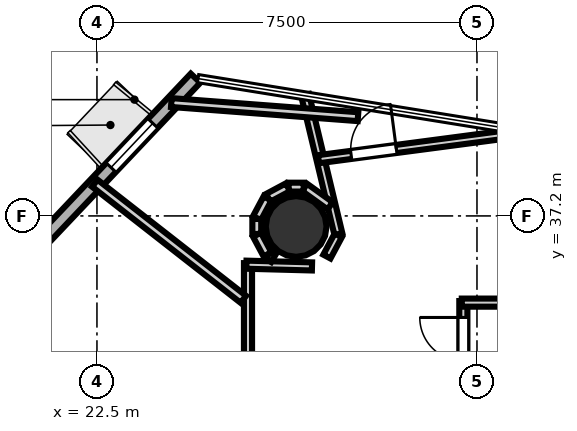
"""IFC4 building model, lengths in metres.
Left out: names, types, materials, properties, quantities, classifications, styles, units other than length and angle.
Written with IfcOpenShell. Run it as: python <this file> out.ifc"""

import sys

from ifc_helpers import new_model, si_unit, direction, frame, frame_2d, origin, origin_2d, place, context, subcontext, project, spatial, rectangle, hollow_circle, extrude, element, fill, save


model = new_model("IFC4")
c1 = context("Model", 3, precision=1e-05, world=origin(), true_north=direction((0.0, 1.0)))
c2 = subcontext(c1, "Body", "Model", "MODEL_VIEW")
j1 = project(units=[si_unit("LENGTHUNIT", "METRE"), si_unit("PLANEANGLEUNIT", "RADIAN")], contexts=[c1])
p1 = place(None, origin())
s1 = spatial("IfcSite", under=j1, at=p1, CompositionType="ELEMENT")
p2 = place(p1, origin())
s2 = spatial("IfcBuilding", under=s1, at=p2, CompositionType="ELEMENT")
p3 = place(p2, frame((0.0, 0.0, 211.4)))
s3 = spatial("IfcBuildingStorey", under=s2, at=p3, CompositionType="ELEMENT", Elevation=211.4)
p4 = place(p3, frame((26.431, 36.992, 0.0), z_axis=(0.0, 0.0, 1.0), x_axis=(1.0, 0.0, 0.0)))
e1 = element("IfcColumn", 1, at=p4, inside=s3, PredefinedType="COLUMN", context=c2, shape_type="SweptSolid", body=[
    extrude(hollow_circle(Radius=0.6, WallThickness=0.03, at=origin_2d()), origin(), (0.0, 0.0, 1.0), 3.7),
])
p5 = place(p3, frame((24.446, 39.918, 0.0), z_axis=(0.0, 0.0, 1.0), x_axis=(-0.687265560939, -0.726406255994, 0.0)))
e2 = element("IfcWall", 2, at=p5, inside=s3, PredefinedType="SOLIDWALL", context=c2, shape_type="SweptSolid", body=[
    extrude(rectangle(XDim=7.155, YDim=0.26, at=frame_2d((3.577, 0.0))), origin(), (0.0, 0.0, 1.0), 3.52),
])
p6 = place(p5, frame((1.226, 0.0, 0.9)))
e3 = element("IfcOpeningElement", 3, at=p6, cuts=e2, PredefinedType="OPENING", context=c2, shape_type="SweptSolid", body=[
    extrude(rectangle(XDim=1.2, YDim=2.0, at=frame_2d((0.6, 1.0))), frame((0.0, 0.14, 0.0), z_axis=(0.0, -1.0, 0.0), x_axis=(1.0, 0.0, 0.0)), (0.0, 0.0, 1.0), 0.28),
])
p7 = place(p5, frame((4.408, 0.0, 0.9)))
e4 = element("IfcOpeningElement", 4, at=p7, cuts=e2, PredefinedType="OPENING", context=c2, shape_type="SweptSolid", body=[
    extrude(rectangle(XDim=1.2, YDim=2.0, at=frame_2d((0.6, 1.0))), frame((0.0, 0.14, 0.0), z_axis=(0.0, -1.0, 0.0), x_axis=(1.0, 0.0, 0.0)), (0.0, 0.0, 1.0), 0.28),
])
p8 = place(p3, frame((29.731, 32.858, 0.0), z_axis=(0.0, 0.0, 1.0), x_axis=(0.0, 1.0, 0.0)))
e5 = element("IfcWall", 5, at=p8, inside=s3, PredefinedType="PARTITIONING", context=c2, shape_type="SweptSolid", body=[
    extrude(rectangle(XDim=2.662, YDim=0.16, at=frame_2d((1.331, 0.0))), origin(), (0.0, 0.0, 1.0), 2.84),
])
p9 = place(p8, frame((1.478, 0.0, 0.0)))
e6 = element("IfcOpeningElement", 6, at=p9, cuts=e5, PredefinedType="OPENING", context=c2, shape_type="SweptSolid", body=[
    extrude(rectangle(XDim=0.86, YDim=2.05, at=frame_2d((0.43, 1.025))), frame((0.0, 0.09, 0.0), z_axis=(0.0, -1.0, 0.0), x_axis=(1.0, 0.0, 0.0)), (0.0, 0.0, 1.0), 0.18),
])
p10 = place(p3, frame((29.7, 35.489, 0.0), z_axis=(0.0, 0.0, 1.0), x_axis=(1.0, 0.0, 0.0)))
e7 = element("IfcWall", 7, at=p10, inside=s3, PredefinedType="PARTITIONING", context=c2, shape_type="SweptSolid", body=[
    extrude(rectangle(XDim=2.72, YDim=0.16, at=frame_2d((1.36, 0.0))), origin(), (0.0, 0.0, 1.0), 2.84),
])
p11 = place(p10, frame((0.76, 0.0, 0.0)))
e8 = element("IfcOpeningElement", 8, at=p11, cuts=e7, PredefinedType="OPENING", context=c2, shape_type="SweptSolid", body=[
    extrude(rectangle(XDim=1.2, YDim=2.15, at=frame_2d((0.6, 1.075))), frame((0.0, 0.09, 0.0), z_axis=(0.0, -1.0, 0.0), x_axis=(1.0, 0.0, 0.0)), (0.0, 0.0, 1.0), 0.18),
])
p12 = place(p3, frame((27.265, 36.839, 0.0), z_axis=(0.0, 0.0, 1.0), x_axis=(-0.23283070684, 0.972517281056, 0.0)))
e9 = element("IfcWall", 9, at=p12, inside=s3, PredefinedType="PARTITIONING", context=c2, shape_type="SweptSolid", body=[
    extrude(rectangle(XDim=2.827, YDim=0.16, at=frame_2d((1.414, 0.0))), origin(), (0.0, 0.0, 1.0), 2.84),
])
p13 = place(p3, frame((26.872, 38.319, 0.0), z_axis=(0.0, 0.0, 1.0), x_axis=(0.99143171072, 0.130626042501, 0.0)))
e10 = element("IfcWall", 10, at=p13, inside=s3, PredefinedType="PARTITIONING", context=c2, shape_type="SweptSolid", body=[
    extrude(rectangle(XDim=4.16, YDim=0.16, at=frame_2d((2.08, 0.0))), origin(), (0.0, 0.0, 1.0), 2.84),
])
p14 = place(p13, frame((0.65, 0.0, 0.0)))
e11 = element("IfcOpeningElement", 11, at=p14, cuts=e10, PredefinedType="OPENING", context=c2, shape_type="SweptSolid", body=[
    extrude(rectangle(XDim=0.9, YDim=2.1, at=frame_2d((0.45, 1.05))), frame((0.0, 0.09, 0.0), z_axis=(0.0, -1.0, 0.0), x_axis=(1.0, 0.0, 0.0)), (0.0, 0.0, 1.0), 0.18),
])
p15 = place(p3, frame((25.481, 18.05, 0.0), z_axis=(0.0, 0.0, 1.0), x_axis=(0.0, 1.0, 0.0)))
e12 = element("IfcWall", 12, at=p15, inside=s3, PredefinedType="PARTITIONING", context=c2, shape_type="SweptSolid", body=[
    extrude(rectangle(XDim=18.219, YDim=0.16, at=frame_2d((9.109, 0.0))), origin(), (0.0, 0.0, 1.0), 2.84),
])
p16 = place(p15, frame((8.659, 0.0, 0.0)))
e13 = element("IfcOpeningElement", 13, at=p16, cuts=e12, PredefinedType="OPENING", context=c2, shape_type="SweptSolid", body=[
    extrude(rectangle(XDim=0.9, YDim=2.1, at=frame_2d((0.45, 1.05))), frame((0.0, 0.09, 0.0), z_axis=(0.0, -1.0, 0.0), x_axis=(1.0, 0.0, 0.0)), (0.0, 0.0, 1.0), 0.18),
])
p17 = place(p3, frame((25.449, 36.238, 0.0), z_axis=(0.0, 0.0, 1.0), x_axis=(0.999651698073, -0.026390955635, 0.0)))
e14 = element("IfcWall", 14, at=p17, inside=s3, PredefinedType="PARTITIONING", context=c2, shape_type="SweptSolid", body=[
    extrude(rectangle(XDim=1.295, YDim=0.16, at=frame_2d((0.647, 0.0))), origin(), (0.0, 0.0, 1.0), 2.84),
])
p18 = place(p3, frame((27.038, 36.398, 0.0), z_axis=(0.0, 0.0, 1.0), x_axis=(0.471865548338, 0.881670519123, 0.0)))
e15 = element("IfcWall", 15, at=p18, inside=s3, PredefinedType="PARTITIONING", context=c2, shape_type="SweptSolid", body=[
    extrude(rectangle(XDim=0.476, YDim=0.16, at=frame_2d((0.238, 0.0))), origin(), (0.0, 0.0, 1.0), 2.84),
])
p19 = place(p3, frame((27.102, 37.4, 0.0), z_axis=(0.0, 0.0, 1.0), x_axis=(-0.811899066426, 0.583797829678, 0.0)))
e16 = element("IfcWall", 16, at=p19, inside=s3, PredefinedType="PLUMBINGWALL", context=c2, shape_type="SweptSolid", body=[
    extrude(rectangle(XDim=0.622, YDim=0.175, at=frame_2d((0.311, 0.0))), origin(), (0.0, 0.0, 1.0), 2.84),
])
p20 = place(p3, frame((26.579, 37.768, 0.0), z_axis=(0.0, 0.0, 1.0), x_axis=(-1.0, 0.0, 0.0)))
e17 = element("IfcWall", 17, at=p20, inside=s3, PredefinedType="PLUMBINGWALL", context=c2, shape_type="SweptSolid", body=[
    extrude(rectangle(XDim=0.297, YDim=0.175, at=frame_2d((0.148, 0.0))), origin(), (0.0, 0.0, 1.0), 2.84),
])
for number, where, z_axis, x_axis in (
    (18, (26.268, 37.765, 0.0), (0.0, 0.0, 1.0), (-0.882, -0.471, 0.0)),
    (19, (25.866, 37.544, 0.0), (0.0, 0.0, 1.0), (-0.471, -0.882, 0.0)),
):
    element("IfcWall", number, at=place(p3, frame(where, z_axis=z_axis, x_axis=x_axis)), inside=s3, PredefinedType="PLUMBINGWALL", context=c2, shape_type="SweptSolid", body=[
        extrude(rectangle(XDim=0.441, YDim=0.175, at=frame_2d((0.221, 0.0))), origin(), (0.0, 0.0, 1.0), 2.84),
    ])
p21 = place(p3, frame((25.655, 37.14, 0.0), z_axis=(0.0, 0.0, 1.0), x_axis=(0.0, -1.0, 0.0)))
e20 = element("IfcWall", 20, at=p21, inside=s3, PredefinedType="PLUMBINGWALL", context=c2, shape_type="SweptSolid", body=[
    extrude(rectangle(XDim=0.297, YDim=0.175, at=frame_2d((0.148, 0.0))), origin(), (0.0, 0.0, 1.0), 2.84),
])
p22 = place(p3, frame((25.658, 36.829, 0.0), z_axis=(0.0, 0.0, 1.0), x_axis=(0.471392110461, -0.881923737177, 0.0)))
e21 = element("IfcWall", 21, at=p22, inside=s3, PredefinedType="PLUMBINGWALL", context=c2, shape_type="SweptSolid", body=[
    extrude(rectangle(XDim=0.441, YDim=0.175, at=frame_2d((0.221, 0.0))), origin(), (0.0, 0.0, 1.0), 2.84),
])
p23 = place(p3, frame((25.878, 36.428, 0.0), z_axis=(0.0, 0.0, 1.0), x_axis=(0.860098766691, -0.510127544382, 0.0)))
e22 = element("IfcWall", 22, at=p23, inside=s3, PredefinedType="PLUMBINGWALL", context=c2, shape_type="SweptSolid", body=[
    extrude(rectangle(XDim=0.124, YDim=0.175, at=frame_2d((0.062, 0.0))), origin(), (0.0, 0.0, 1.0), 2.84),
])
p24 = place(p3, frame((25.389, 35.555, 0.0), z_axis=(0.0, 0.0, 1.0), x_axis=(-0.788025368562, 0.615642768578, 0.0)))
e23 = element("IfcWall", 23, at=p24, inside=s3, PredefinedType="PLUMBINGWALL", context=c2, shape_type="SweptSolid", body=[
    extrude(rectangle(XDim=3.72, YDim=0.175, at=frame_2d((1.86, 0.0))), origin(), (0.0, 0.0, 1.0), 2.84),
])
p25 = place(p3, frame((23.968, 39.437, 0.0), z_axis=(0.0, 0.0, 1.0), x_axis=(0.997153162086, -0.075402727678, 0.0)))
e24 = element("IfcWall", 24, at=p25, inside=s3, PredefinedType="PLUMBINGWALL", context=c2, shape_type="SweptSolid", body=[
    extrude(rectangle(XDim=3.694, YDim=0.175, at=frame_2d((1.847, 0.0))), origin(), (0.0, 0.0, 1.0), 2.84),
])
p26 = place(p3, frame((22.306, 25.415, 0.0), z_axis=(0.0, 0.0, 1.0), x_axis=(-0.232253113471, 0.972655381563, 0.0)))
e25 = element("IfcWall", 25, at=p26, inside=s3, PredefinedType="PLUMBINGWALL", context=c2, shape_type="SweptSolid", body=[
    extrude(rectangle(XDim=10.069, YDim=0.175, at=frame_2d((5.035, 0.0))), origin(), (0.0, 0.0, 1.0), 2.84),
])
p27 = place(p9, origin())
e26 = element("IfcDoor", 26, at=p27, inside=s3, OperationType="SINGLE_SWING_RIGHT", PredefinedType="DOOR", context=c2, shape_type="SweptSolid", body=[
    extrude(rectangle(XDim=0.86, YDim=2.05, at=frame_2d((0.43, 1.025))), frame((0.0, 0.025, 0.0), z_axis=(0.0, -1.0, 0.0), x_axis=(1.0, 0.0, 0.0)), (0.0, 0.0, 1.0), 0.05),
])
fill(e6, e26)
p28 = place(p14, origin())
e27 = element("IfcDoor", 27, at=p28, inside=s3, OperationType="SINGLE_SWING_RIGHT", PredefinedType="DOOR", context=c2, shape_type="SweptSolid", body=[
    extrude(rectangle(XDim=0.9, YDim=2.1, at=frame_2d((0.45, 1.05))), frame((0.0, 0.025, 0.0), z_axis=(0.0, -1.0, 0.0), x_axis=(1.0, 0.0, 0.0)), (0.0, 0.0, 1.0), 0.05),
])
fill(e11, e27)
p29 = place(p6, origin())
e28 = element("IfcWindow", 28, at=p29, inside=s3, PartitioningType="SINGLE_PANEL", PredefinedType="WINDOW", context=c2, shape_type="SweptSolid", body=[
    extrude(rectangle(XDim=1.2, YDim=2.0, at=frame_2d((0.6, 1.0))), frame((0.0, 0.03, 0.0), z_axis=(0.0, -1.0, 0.0), x_axis=(1.0, 0.0, 0.0)), (0.0, 0.0, 1.0), 0.06),
])
fill(e3, e28)
save(model, sys.argv[1])
